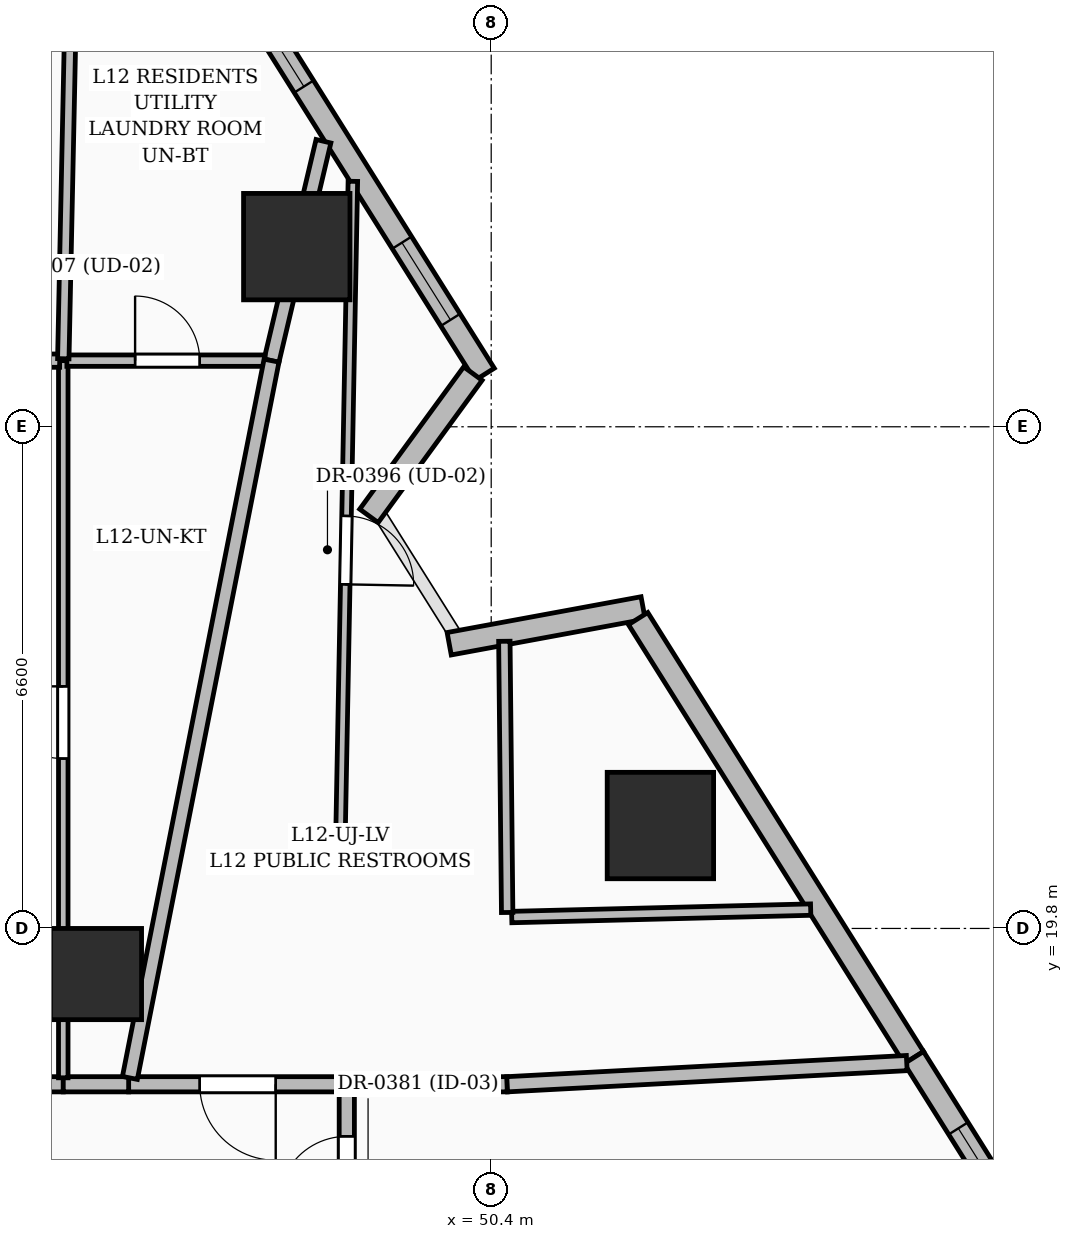
"""IFC4 building model, lengths in metres.
Left out: names, types, materials, properties, quantities, classifications, styles, units other than length and angle.
Written with IfcOpenShell. Run it as: python <this file> out.ifc"""

import sys

from ifc_helpers import new_model, si_unit, direction, frame, frame_2d, origin, origin_2d, place, context, subcontext, project, spatial, rectangle, extrude, element, fill, save


model = new_model("IFC4")
c1 = context("Model", 3, precision=1e-05, world=origin(), true_north=direction((0.0, 1.0)))
c2 = subcontext(c1, "Body", "Model", "MODEL_VIEW")
j1 = project(units=[si_unit("LENGTHUNIT", "METRE"), si_unit("PLANEANGLEUNIT", "RADIAN")], contexts=[c1])
p1 = place(None, origin())
s1 = spatial("IfcSite", under=j1, at=p1, CompositionType="ELEMENT")
p2 = place(p1, origin())
s2 = spatial("IfcBuilding", under=s1, at=p2, CompositionType="ELEMENT")
p3 = place(p2, frame((0.0, 0.0, 53.4)))
s3 = spatial("IfcBuildingStorey", under=s2, at=p3, CompositionType="ELEMENT", Elevation=53.4)
p4 = place(p3, frame((45.2, 19.2, 0.0), z_axis=(0.0, 0.0, 1.0), x_axis=(1.0, 0.0, 0.0)))
e1 = element("IfcColumn", 1, at=p4, inside=s3, PredefinedType="COLUMN", context=c2, shape_type="SweptSolid", body=[
    extrude(rectangle(XDim=1.2, YDim=1.2, at=origin_2d()), origin(), (0.0, 0.0, 1.0), 3.6),
])
for number, where, z_axis, x_axis in (
    (2, (52.626, 21.154, 0.0), (0.0, 0.0, 1.0), (1.0, 0.0, 0.0)),
    (3, (47.842, 28.77, 0.0), (0.0, 0.0, 1.0), (1.0, 0.0, 0.0)),
):
    element("IfcColumn", number, at=place(p3, frame(where, z_axis=z_axis, x_axis=x_axis)), inside=s3, PredefinedType="COLUMN", context=c2, shape_type="SweptSolid", body=[
        extrude(rectangle(XDim=1.4, YDim=1.4, at=origin_2d()), origin(), (0.0, 0.0, 1.0), 3.6),
    ])
p5 = place(p3, frame((46.54, 33.099, 0.0), z_axis=(0.0, 0.0, 1.0), x_axis=(0.531881188868, -0.846818989471, 0.0)))
e4 = element("IfcWall", 4, at=p5, inside=s3, PredefinedType="SOLIDWALL", context=c2, shape_type="SweptSolid", body=[
    extrude(rectangle(XDim=7.095, YDim=0.3, at=frame_2d((3.548, 0.0))), origin(), (0.0, 0.0, 1.0), 3.35),
])
p6 = place(p5, frame((5.05, 0.0, 0.8)))
e5 = element("IfcOpeningElement", 5, at=p6, cuts=e4, PredefinedType="OPENING", context=c2, shape_type="SweptSolid", body=[
    extrude(rectangle(XDim=1.2, YDim=1.8, at=frame_2d((0.6, 0.9))), frame((0.0, 0.16, 0.0), z_axis=(0.0, -1.0, 0.0), x_axis=(1.0, 0.0, 0.0)), (0.0, 0.0, 1.0), 0.32),
])
p7 = place(p5, frame((1.425, 0.0, 0.8)))
e6 = element("IfcOpeningElement", 6, at=p7, cuts=e4, PredefinedType="OPENING", context=c2, shape_type="SweptSolid", body=[
    extrude(rectangle(XDim=1.2, YDim=1.8, at=frame_2d((0.6, 0.9))), frame((0.0, 0.16, 0.0), z_axis=(0.0, -1.0, 0.0), x_axis=(1.0, 0.0, 0.0)), (0.0, 0.0, 1.0), 0.32),
])
p8 = place(p3, frame((50.159, 27.1, 0.0), z_axis=(0.0, 0.0, 1.0), x_axis=(-0.589910976018, -0.80746829063, 0.0)))
e7 = element("IfcWall", 7, at=p8, inside=s3, PredefinedType="SOLIDWALL", context=c2, shape_type="SweptSolid", body=[
    extrude(rectangle(XDim=2.318, YDim=0.3, at=frame_2d((1.159, 0.0))), origin(), (0.0, 0.0, 1.0), 2.375),
])
p9 = place(p3, frame((49.847, 23.546, 0.0), z_axis=(0.0, 0.0, 1.0), x_axis=(0.98340285181, 0.181435473521, 0.0)))
e8 = element("IfcWall", 8, at=p9, inside=s3, PredefinedType="SOLIDWALL", context=c2, shape_type="SweptSolid", body=[
    extrude(rectangle(XDim=2.594, YDim=0.3, at=frame_2d((1.297, 0.0))), origin(), (0.0, 0.0, 1.0), 2.375),
])
p10 = place(p3, frame((52.333, 23.877, 0.0), z_axis=(0.0, 0.0, 1.0), x_axis=(0.531902467435, -0.846805624176, 0.0)))
e9 = element("IfcWall", 9, at=p10, inside=s3, PredefinedType="SOLIDWALL", context=c2, shape_type="SweptSolid", body=[
    extrude(rectangle(XDim=6.82, YDim=0.3, at=frame_2d((3.41, 0.0))), origin(), (0.0, 0.0, 1.0), 3.35),
])
p11 = place(p3, frame((55.96, 18.101, 0.0), z_axis=(0.0, 0.0, 1.0), x_axis=(0.531905862358, -0.84680349172, 0.0)))
e10 = element("IfcWall", 10, at=p11, inside=s3, PredefinedType="SOLIDWALL", context=c2, shape_type="SweptSolid", body=[
    extrude(rectangle(XDim=7.095, YDim=0.3, at=frame_2d((3.548, 0.0))), origin(), (0.0, 0.0, 1.0), 3.35),
])
p12 = place(p11, frame((4.35, 0.0, 0.55)))
e11 = element("IfcOpeningElement", 11, at=p12, cuts=e10, PredefinedType="OPENING", context=c2, shape_type="SweptSolid", body=[
    extrude(rectangle(XDim=1.6, YDim=2.2, at=frame_2d((0.8, 1.1))), frame((0.0, 0.16, 0.0), z_axis=(0.0, -1.0, 0.0), x_axis=(1.0, 0.0, 0.0)), (0.0, 0.0, 1.0), 0.32),
])
p13 = place(p11, frame((1.1, 0.0, 0.55)))
e12 = element("IfcOpeningElement", 12, at=p13, cuts=e10, PredefinedType="OPENING", context=c2, shape_type="SweptSolid", body=[
    extrude(rectangle(XDim=1.6, YDim=2.2, at=frame_2d((0.8, 1.1))), frame((0.0, 0.16, 0.0), z_axis=(0.0, -1.0, 0.0), x_axis=(1.0, 0.0, 0.0)), (0.0, 0.0, 1.0), 0.32),
])
p14 = place(p3, frame((48.5, 15.48, 0.0), z_axis=(0.0, 0.0, 1.0), x_axis=(0.0, 1.0, 0.0)))
e13 = element("IfcWall", 13, at=p14, inside=s3, PredefinedType="PARTITIONING", context=c2, shape_type="SweptSolid", body=[
    extrude(rectangle(XDim=2.27, YDim=0.2, at=frame_2d((1.135, 0.0))), origin(), (0.0, 0.0, 1.0), 2.279),
])
p15 = place(p14, frame((0.685, 0.0, 0.0)))
e14 = element("IfcOpeningElement", 14, at=p15, cuts=e13, PredefinedType="OPENING", context=c2, shape_type="SweptSolid", body=[
    extrude(rectangle(XDim=0.9, YDim=2.1, at=frame_2d((0.45, 1.05))), frame((0.0, 0.11, 0.0), z_axis=(0.0, -1.0, 0.0), x_axis=(1.0, 0.0, 0.0)), (0.0, 0.0, 1.0), 0.22),
])
p16 = place(p3, frame((48.415, 17.75, 0.0), z_axis=(0.0, 0.0, 1.0), x_axis=(-1.0, 0.0, 0.0)))
e15 = element("IfcWall", 15, at=p16, inside=s3, PredefinedType="PARTITIONING", context=c2, shape_type="SweptSolid", body=[
    extrude(rectangle(XDim=2.785, YDim=0.2, at=frame_2d((1.393, 0.0))), origin(), (0.0, 0.0, 1.0), 2.309),
])
p17 = place(p16, frame((0.85, 0.0, 0.0)))
e16 = element("IfcOpeningElement", 16, at=p17, cuts=e15, PredefinedType="OPENING", context=c2, shape_type="SweptSolid", body=[
    extrude(rectangle(XDim=1.0, YDim=2.2, at=frame_2d((0.5, 1.1))), frame((0.0, 0.11, 0.0), z_axis=(0.0, -1.0, 0.0), x_axis=(1.0, 0.0, 0.0)), (0.0, 0.0, 1.0), 0.22),
])
p18 = place(p3, frame((44.77, 17.75, 0.0), z_axis=(0.0, 0.0, 1.0), x_axis=(-1.0, 0.0, 0.0)))
e17 = element("IfcWall", 17, at=p18, inside=s3, PredefinedType="PARTITIONING", context=c2, shape_type="SweptSolid", body=[
    extrude(rectangle(XDim=2.02, YDim=0.2, at=frame_2d((1.01, 0.0))), origin(), (0.0, 0.0, 1.0), 3.35),
])
p19 = place(p18, frame((0.457, 0.0, 0.0)))
e18 = element("IfcOpeningElement", 18, at=p19, cuts=e17, PredefinedType="OPENING", context=c2, shape_type="SweptSolid", body=[
    extrude(rectangle(XDim=1.0, YDim=2.2, at=frame_2d((0.5, 1.1))), frame((0.0, 0.11, 0.0), z_axis=(0.0, -1.0, 0.0), x_axis=(1.0, 0.0, 0.0)), (0.0, 0.0, 1.0), 0.22),
])
p20 = place(p3, frame((45.63, 17.75, 0.0), z_axis=(0.0, 0.0, 1.0), x_axis=(-1.0, 0.0, 0.0)))
e19 = element("IfcWall", 19, at=p20, inside=s3, PredefinedType="PARTITIONING", context=c2, shape_type="SweptSolid", body=[
    extrude(rectangle(XDim=0.86, YDim=0.2, at=frame_2d((0.43, 0.0))), origin(), (0.0, 0.0, 1.0), 2.309),
])
p21 = place(p3, frame((50.61, 17.75, 0.0), z_axis=(0.0, 0.0, 1.0), x_axis=(-1.0, 0.0, 0.0)))
e20 = element("IfcWall", 20, at=p21, inside=s3, PredefinedType="PARTITIONING", context=c2, shape_type="SweptSolid", body=[
    extrude(rectangle(XDim=2.025, YDim=0.2, at=frame_2d((1.013, 0.0))), origin(), (0.0, 0.0, 1.0), 2.279),
])
p22 = place(p3, frame((55.867, 18.029, 0.0), z_axis=(0.0, 0.0, 1.0), x_axis=(-0.998594026739, -0.053009147899, 0.0)))
e21 = element("IfcWall", 21, at=p22, inside=s3, PredefinedType="PARTITIONING", context=c2, shape_type="SweptSolid", body=[
    extrude(rectangle(XDim=5.264, YDim=0.2, at=frame_2d((2.632, 0.0))), origin(), (0.0, 0.0, 1.0), 2.37),
])
p23 = place(p3, frame((48.58, 29.629, 0.0), z_axis=(0.0, 0.0, 1.0), x_axis=(-0.01892705246, -0.999820867298, 0.0)))
e22 = element("IfcWall", 22, at=p23, inside=s3, PredefinedType="PARTITIONING", context=c2, shape_type="SweptSolid", body=[
    extrude(rectangle(XDim=8.991, YDim=0.125, at=frame_2d((4.495, 0.0))), origin(), (0.0, 0.0, 1.0), 2.37),
])
p24 = place(p23, frame((4.403, 0.0, 0.0)))
e23 = element("IfcOpeningElement", 23, at=p24, cuts=e22, PredefinedType="OPENING", context=c2, shape_type="SweptSolid", body=[
    extrude(rectangle(XDim=0.9, YDim=2.15, at=frame_2d((0.45, 1.075))), frame((0.0, 0.072, 0.0), z_axis=(0.0, -1.0, 0.0), x_axis=(1.0, 0.0, 0.0)), (0.0, 0.0, 1.0), 0.145),
])
p25 = place(p3, frame((48.193, 30.156, 0.0), z_axis=(0.0, 0.0, 1.0), x_axis=(-0.230296152423, -0.973120589742, 0.0)))
e24 = element("IfcWall", 24, at=p25, inside=s3, PredefinedType="PARTITIONING", context=c2, shape_type="SweptSolid", body=[
    extrude(rectangle(XDim=2.966, YDim=0.2, at=frame_2d((1.483, 0.0))), origin(), (0.0, 0.0, 1.0), 2.279),
])
p26 = place(p3, frame((44.77, 17.835, 0.0), z_axis=(0.0, 0.0, 1.0), x_axis=(0.0, 1.0, 0.0)))
e25 = element("IfcWall", 25, at=p26, inside=s3, PredefinedType="PARTITIONING", context=c2, shape_type="SweptSolid", body=[
    extrude(rectangle(XDim=9.435, YDim=0.125, at=frame_2d((4.718, 0.0))), origin(), (0.0, 0.0, 1.0), 2.309),
])
p27 = place(p26, frame((4.2, 0.0, 0.0)))
e26 = element("IfcOpeningElement", 26, at=p27, cuts=e25, PredefinedType="OPENING", context=c2, shape_type="SweptSolid", body=[
    extrude(rectangle(XDim=0.95, YDim=2.2, at=frame_2d((0.475, 1.1))), frame((0.0, 0.072, 0.0), z_axis=(0.0, -1.0, 0.0), x_axis=(1.0, 0.0, 0.0)), (0.0, 0.0, 1.0), 0.145),
])
p28 = place(p3, frame((44.722, 27.27, 0.0), z_axis=(0.0, 0.0, 1.0), x_axis=(-1.0, 0.0, 0.0)))
e27 = element("IfcWall", 27, at=p28, inside=s3, PredefinedType="PARTITIONING", context=c2, shape_type="SweptSolid", body=[
    extrude(rectangle(XDim=1.887, YDim=0.175, at=frame_2d((0.944, 0.0))), origin(), (0.0, 0.0, 1.0), 2.279),
])
p29 = place(p28, frame((0.302, 0.0, 0.0)))
e28 = element("IfcOpeningElement", 28, at=p29, cuts=e27, PredefinedType="OPENING", context=c2, shape_type="SweptSolid", body=[
    extrude(rectangle(XDim=0.9, YDim=2.15, at=frame_2d((0.45, 1.075))), frame((0.0, 0.097, 0.0), z_axis=(0.0, -1.0, 0.0), x_axis=(1.0, 0.0, 0.0)), (0.0, 0.0, 1.0), 0.195),
])
p30 = place(p3, frame((44.817, 27.27, 0.0), z_axis=(0.0, 0.0, 1.0), x_axis=(1.0, 0.0, 0.0)))
e29 = element("IfcWall", 29, at=p30, inside=s3, PredefinedType="PARTITIONING", context=c2, shape_type="SweptSolid", body=[
    extrude(rectangle(XDim=2.608, YDim=0.15, at=frame_2d((1.304, 0.0))), origin(), (0.0, 0.0, 1.0), 2.279),
])
p31 = place(p30, frame((0.897, 0.0, 0.0)))
e30 = element("IfcOpeningElement", 30, at=p31, cuts=e29, PredefinedType="OPENING", context=c2, shape_type="SweptSolid", body=[
    extrude(rectangle(XDim=0.85, YDim=2.1, at=frame_2d((0.425, 1.05))), frame((0.0, 0.085, 0.0), z_axis=(0.0, -1.0, 0.0), x_axis=(1.0, 0.0, 0.0)), (0.0, 0.0, 1.0), 0.17),
])
p32 = place(p3, frame((44.941, 35.421, 0.0), z_axis=(0.0, 0.0, 1.0), x_axis=(-0.020966427288, -0.999780180303, 0.0)))
e31 = element("IfcWall", 31, at=p32, inside=s3, PredefinedType="PARTITIONING", context=c2, shape_type="SweptSolid", body=[
    extrude(rectangle(XDim=8.128, YDim=0.15, at=frame_2d((4.064, 0.0))), origin(), (0.0, 0.0, 1.0), 2.37),
])
p33 = place(p3, frame((47.51, 27.27, 0.0), z_axis=(0.0, 0.0, 1.0), x_axis=(-0.193738465681, -0.981053213091, 0.0)))
e32 = element("IfcWall", 32, at=p33, inside=s3, PredefinedType="PARTITIONING", context=c2, shape_type="SweptSolid", body=[
    extrude(rectangle(XDim=9.619, YDim=0.2, at=frame_2d((4.809, 0.0))), origin(), (0.0, 0.0, 1.0), 2.279),
])
p34 = place(p3, frame((54.603, 20.048, 0.0), z_axis=(0.0, 0.0, 1.0), x_axis=(-0.999688808111, -0.024945679755, 0.0)))
e33 = element("IfcWall", 33, at=p34, inside=s3, PredefinedType="PARTITIONING", context=c2, shape_type="SweptSolid", body=[
    extrude(rectangle(XDim=3.934, YDim=0.15, at=frame_2d((1.967, 0.0))), origin(), (0.0, 0.0, 1.0), 2.279),
])
p35 = place(p3, frame((50.61, 20.01, 0.0), z_axis=(0.0, 0.0, 1.0), x_axis=(-0.01040042281, 0.99994591414, 0.0)))
e34 = element("IfcWall", 34, at=p35, inside=s3, PredefinedType="PARTITIONING", context=c2, shape_type="SweptSolid", body=[
    extrude(rectangle(XDim=3.568, YDim=0.15, at=frame_2d((1.784, 0.0))), origin(), (0.0, 0.0, 1.0), 3.35),
])
p36 = place(p6, origin())
e35 = element("IfcWindow", 35, at=p36, inside=s3, PartitioningType="SINGLE_PANEL", PredefinedType="WINDOW", context=c2, shape_type="SweptSolid", body=[
    extrude(rectangle(XDim=1.2, YDim=1.8, at=frame_2d((0.6, 0.9))), frame((0.0, 0.03, 0.0), z_axis=(0.0, -1.0, 0.0), x_axis=(1.0, 0.0, 0.0)), (0.0, 0.0, 1.0), 0.06),
])
fill(e5, e35)
p37 = place(p7, origin())
e36 = element("IfcWindow", 36, at=p37, inside=s3, PartitioningType="SINGLE_PANEL", PredefinedType="WINDOW", context=c2, shape_type="SweptSolid", body=[
    extrude(rectangle(XDim=1.2, YDim=1.8, at=frame_2d((0.6, 0.9))), frame((0.0, 0.03, 0.0), z_axis=(0.0, -1.0, 0.0), x_axis=(1.0, 0.0, 0.0)), (0.0, 0.0, 1.0), 0.06),
])
fill(e6, e36)
p38 = place(p13, origin())
e37 = element("IfcWindow", 37, at=p38, inside=s3, PartitioningType="SINGLE_PANEL", PredefinedType="WINDOW", context=c2, shape_type="SweptSolid", body=[
    extrude(rectangle(XDim=1.6, YDim=2.2, at=frame_2d((0.8, 1.1))), frame((0.0, 0.03, 0.0), z_axis=(0.0, -1.0, 0.0), x_axis=(1.0, 0.0, 0.0)), (0.0, 0.0, 1.0), 0.06),
])
fill(e12, e37)
p39 = place(p15, origin())
e38 = element("IfcDoor", 38, at=p39, inside=s3, OperationType="SINGLE_SWING_LEFT", PredefinedType="DOOR", context=c2, shape_type="SweptSolid", body=[
    extrude(rectangle(XDim=0.9, YDim=2.1, at=frame_2d((0.45, 1.05))), frame((0.0, 0.025, 0.0), z_axis=(0.0, -1.0, 0.0), x_axis=(1.0, 0.0, 0.0)), (0.0, 0.0, 1.0), 0.05),
])
fill(e14, e38)
p40 = place(p17, origin())
e39 = element("IfcDoor", 39, at=p40, inside=s3, OperationType="SINGLE_SWING_LEFT", PredefinedType="DOOR", context=c2, shape_type="SweptSolid", body=[
    extrude(rectangle(XDim=1.0, YDim=2.2, at=frame_2d((0.5, 1.1))), frame((0.0, 0.025, 0.0), z_axis=(0.0, -1.0, 0.0), x_axis=(1.0, 0.0, 0.0)), (0.0, 0.0, 1.0), 0.05),
])
fill(e16, e39)
p41 = place(p24, origin())
e40 = element("IfcDoor", 40, at=p41, inside=s3, OperationType="SINGLE_SWING_RIGHT", PredefinedType="DOOR", context=c2, shape_type="SweptSolid", body=[
    extrude(rectangle(XDim=0.9, YDim=2.15, at=frame_2d((0.45, 1.075))), frame((0.0, 0.025, 0.0), z_axis=(0.0, -1.0, 0.0), x_axis=(1.0, 0.0, 0.0)), (0.0, 0.0, 1.0), 0.05),
])
fill(e23, e40)
p42 = place(p27, origin())
e41 = element("IfcDoor", 41, at=p42, inside=s3, OperationType="SINGLE_SWING_RIGHT", PredefinedType="DOOR", context=c2, shape_type="SweptSolid", body=[
    extrude(rectangle(XDim=0.95, YDim=2.2, at=frame_2d((0.475, 1.1))), frame((0.0, 0.025, 0.0), z_axis=(0.0, -1.0, 0.0), x_axis=(1.0, 0.0, 0.0)), (0.0, 0.0, 1.0), 0.05),
])
fill(e26, e41)
p43 = place(p31, origin())
e42 = element("IfcDoor", 42, at=p43, inside=s3, OperationType="SINGLE_SWING_LEFT", PredefinedType="DOOR", context=c2, shape_type="SweptSolid", body=[
    extrude(rectangle(XDim=0.85, YDim=2.1, at=frame_2d((0.425, 1.05))), frame((0.0, 0.025, 0.0), z_axis=(0.0, -1.0, 0.0), x_axis=(1.0, 0.0, 0.0)), (0.0, 0.0, 1.0), 0.05),
])
fill(e30, e42)
save(model, sys.argv[1])
